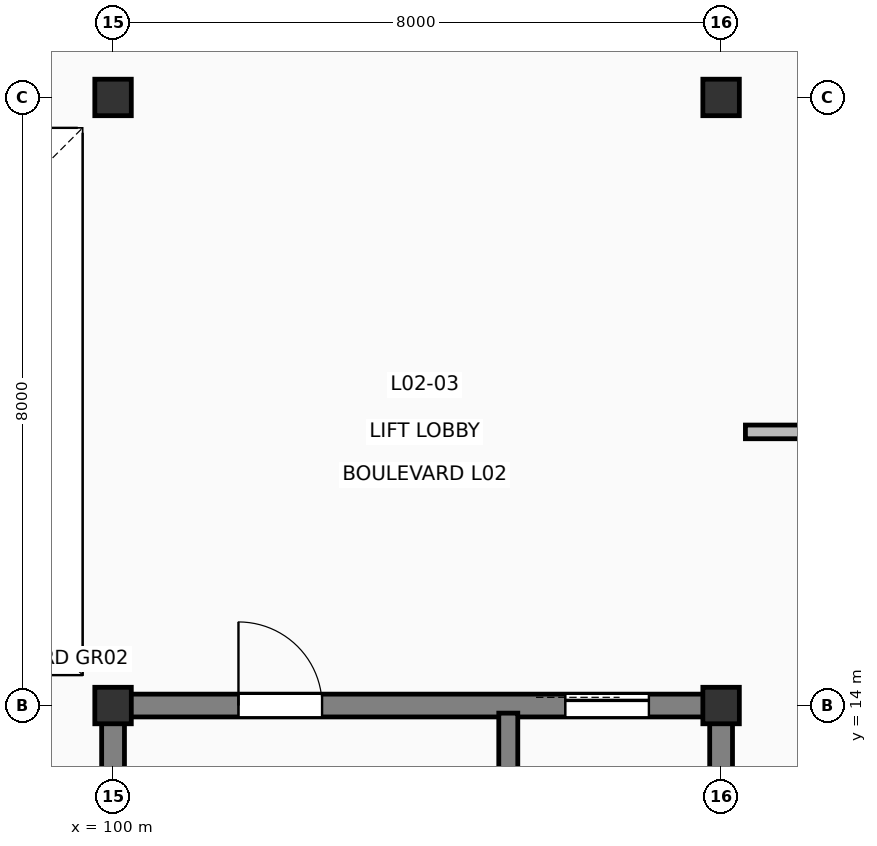
"""IFC4 building model, lengths in metres.
Left out: names, types, materials, properties, quantities, classifications, styles, units other than length and angle.
Written with IfcOpenShell. Run it as: python <this file> out.ifc"""

import sys

from ifc_helpers import new_model, si_unit, direction, frame, frame_2d, origin, origin_2d, place, context, subcontext, project, spatial, rectangle, extrude, element, fill, save


model = new_model("IFC4")
c1 = context("Model", 3, precision=1e-05, world=origin(), true_north=direction((0.0, 1.0)))
c2 = subcontext(c1, "Body", "Model", "MODEL_VIEW")
j1 = project(units=[si_unit("LENGTHUNIT", "METRE"), si_unit("PLANEANGLEUNIT", "RADIAN")], contexts=[c1])
p1 = place(None, origin())
s1 = spatial("IfcSite", under=j1, at=p1, CompositionType="ELEMENT")
p2 = place(p1, origin())
s2 = spatial("IfcBuilding", under=s1, at=p2, CompositionType="ELEMENT")
p3 = place(p2, frame((0.0, 0.0, 9.6)))
s3 = spatial("IfcBuildingStorey", under=s2, at=p3, CompositionType="ELEMENT", Elevation=9.6)
for number, where, z_axis, x_axis in (
    (1, (100.0, 14.0, 0.0), (0.0, 0.0, 1.0), (1.0, 0.0, 0.0)),
    (2, (100.0, 22.0, 0.0), (0.0, 0.0, 1.0), (1.0, 0.0, 0.0)),
    (3, (108.0, 14.0, 0.0), (0.0, 0.0, 1.0), (1.0, 0.0, 0.0)),
    (4, (108.0, 22.0, 0.0), (0.0, 0.0, 1.0), (1.0, 0.0, 0.0)),
):
    element("IfcColumn", number, at=place(p3, frame(where, z_axis=z_axis, x_axis=x_axis)), inside=s3, PredefinedType="COLUMN", context=c2, shape_type="SweptSolid", body=[
        extrude(rectangle(XDim=0.48, YDim=0.48, at=origin_2d()), origin(), (0.0, 0.0, 1.0), 4.2),
    ])
p4 = place(p3, frame((100.0, 6.0, 0.0), z_axis=(0.0, 0.0, 1.0), x_axis=(0.0, 1.0, 0.0)))
e5 = element("IfcWall", 5, at=p4, inside=s3, PredefinedType="SHEAR", context=c2, shape_type="SweptSolid", body=[
    extrude(rectangle(XDim=8.0, YDim=0.3, at=frame_2d((4.0, 0.0))), origin(), (0.0, 0.0, 1.0), 4.2),
])
p5 = place(p3, frame((100.0, 14.0, 0.0), z_axis=(0.0, 0.0, 1.0), x_axis=(1.0, 0.0, 0.0)))
e6 = element("IfcWall", 6, at=p5, inside=s3, PredefinedType="SHEAR", context=c2, shape_type="SweptSolid", body=[
    extrude(rectangle(XDim=8.0, YDim=0.3, at=frame_2d((4.0, 0.0))), origin(), (0.0, 0.0, 1.0), 4.2),
])
p6 = place(p5, frame((1.65, 0.0, 0.0)))
e7 = element("IfcOpeningElement", 7, at=p6, cuts=e6, PredefinedType="OPENING", context=c2, shape_type="SweptSolid", body=[
    extrude(rectangle(XDim=1.1, YDim=2.2, at=frame_2d((0.55, 1.1))), frame((0.0, 0.16, 0.0), z_axis=(0.0, -1.0, 0.0), x_axis=(1.0, 0.0, 0.0)), (0.0, 0.0, 1.0), 0.32),
])
p7 = place(p5, frame((5.95, 0.0, 0.0)))
e8 = element("IfcOpeningElement", 8, at=p7, cuts=e6, PredefinedType="OPENING", context=c2, shape_type="SweptSolid", body=[
    extrude(rectangle(XDim=1.1, YDim=2.2, at=frame_2d((0.55, 1.1))), frame((0.0, 0.16, 0.0), z_axis=(0.0, -1.0, 0.0), x_axis=(1.0, 0.0, 0.0)), (0.0, 0.0, 1.0), 0.32),
])
p8 = place(p3, frame((108.0, 14.0, 0.0), z_axis=(0.0, 0.0, 1.0), x_axis=(0.0, -1.0, 0.0)))
e9 = element("IfcWall", 9, at=p8, inside=s3, PredefinedType="SHEAR", context=c2, shape_type="SweptSolid", body=[
    extrude(rectangle(XDim=8.0, YDim=0.3, at=frame_2d((4.0, 0.0))), origin(), (0.0, 0.0, 1.0), 4.2),
])
p9 = place(p3, frame((105.2, 6.1, 0.0), z_axis=(0.0, 0.0, 1.0), x_axis=(0.0, 1.0, 0.0)))
e10 = element("IfcWall", 10, at=p9, inside=s3, PredefinedType="SHEAR", context=c2, shape_type="SweptSolid", body=[
    extrude(rectangle(XDim=7.8, YDim=0.25, at=frame_2d((3.9, 0.0))), origin(), (0.0, 0.0, 1.0), 4.2),
])
p10 = place(p3, frame((131.68, 17.6, 0.0), z_axis=(0.0, 0.0, 1.0), x_axis=(-1.0, 0.0, 0.0)))
e11 = element("IfcWall", 11, at=p10, inside=s3, PredefinedType="PARTITIONING", context=c2, shape_type="SweptSolid", body=[
    extrude(rectangle(XDim=23.36, YDim=0.18, at=frame_2d((11.68, 0.0))), origin(), (0.0, 0.0, 1.0), 3.98),
])
p11 = place(p10, frame((11.18, 0.0, 0.0)))
e12 = element("IfcOpeningElement", 12, at=p11, cuts=e11, PredefinedType="OPENING", context=c2, shape_type="SweptSolid", body=[
    extrude(rectangle(XDim=1.0, YDim=2.15, at=frame_2d((0.5, 1.075))), frame((0.0, 0.1, 0.0), z_axis=(0.0, -1.0, 0.0), x_axis=(1.0, 0.0, 0.0)), (0.0, 0.0, 1.0), 0.2),
])
p12 = place(p6, origin())
e13 = element("IfcDoor", 13, at=p12, inside=s3, OperationType="SINGLE_SWING_LEFT", PredefinedType="DOOR", context=c2, shape_type="SweptSolid", body=[
    extrude(rectangle(XDim=1.1, YDim=2.2, at=frame_2d((0.55, 1.1))), frame((0.0, 0.025, 0.0), z_axis=(0.0, -1.0, 0.0), x_axis=(1.0, 0.0, 0.0)), (0.0, 0.0, 1.0), 0.05),
])
fill(e7, e13)
p13 = place(p7, origin())
e14 = element("IfcDoor", 14, at=p13, inside=s3, OperationType="SLIDING_TO_LEFT", PredefinedType="DOOR", context=c2, shape_type="SweptSolid", body=[
    extrude(rectangle(XDim=1.1, YDim=2.2, at=frame_2d((0.55, 1.1))), frame((0.0, 0.025, 0.0), z_axis=(0.0, -1.0, 0.0), x_axis=(1.0, 0.0, 0.0)), (0.0, 0.0, 1.0), 0.05),
])
fill(e8, e14)
save(model, sys.argv[1])
